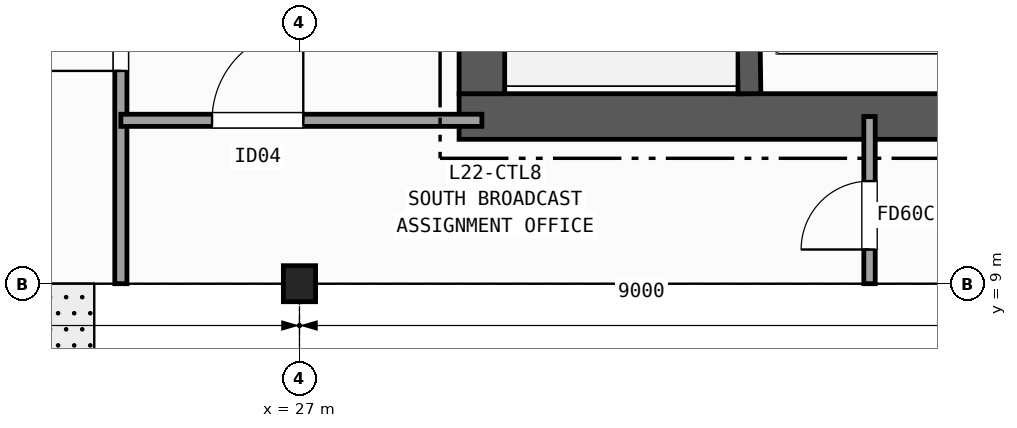
"""IFC4 building model, lengths in metres.
Left out: names, types, materials, properties, quantities, classifications, styles, units other than length and angle.
Written with IfcOpenShell. Run it as: python <this file> out.ifc"""

import sys

from ifc_helpers import new_model, si_unit, direction, frame, frame_2d, origin, origin_2d, place, context, subcontext, project, spatial, rectangle, i_section, extrude, element, fill, save


model = new_model("IFC4")
c1 = context("Model", 3, precision=1e-05, world=origin(), true_north=direction((0.0, 1.0)))
c2 = subcontext(c1, "Body", "Model", "MODEL_VIEW")
j1 = project(units=[si_unit("LENGTHUNIT", "METRE"), si_unit("PLANEANGLEUNIT", "RADIAN")], contexts=[c1])
p1 = place(None, origin())
s1 = spatial("IfcSite", under=j1, at=p1, CompositionType="ELEMENT")
p2 = place(p1, origin())
s2 = spatial("IfcBuilding", under=s1, at=p2, CompositionType="ELEMENT")
p3 = place(p2, frame((0.0, 0.0, 92.8)))
s3 = spatial("IfcBuildingStorey", under=s2, at=p3, CompositionType="ELEMENT", Elevation=92.8)
p4 = place(p3, frame((27.0, 9.0, 0.0), z_axis=(0.0, 0.0, 1.0), x_axis=(1.0, 0.0, 0.0)))
e1 = element("IfcColumn", 1, at=p4, inside=s3, PredefinedType="COLUMN", context=c2, shape_type="SweptSolid", body=[
    extrude(i_section(OverallWidth=0.424, OverallDepth=0.474, WebThickness=0.048, FlangeThickness=0.077, FilletRadius=0.015, at=origin_2d()), origin(), (0.0, 0.0, 1.0), 3.7),
])
p5 = place(p3, frame((29.1, 11.2, 0.0), z_axis=(0.0, 0.0, 1.0), x_axis=(1.0, 0.0, 0.0)))
e2 = element("IfcWall", 2, at=p5, inside=s3, PredefinedType="SHEAR", context=c2, shape_type="SweptSolid", body=[
    extrude(rectangle(XDim=14.0, YDim=0.6, at=frame_2d((7.0, 0.0))), origin(), (0.0, 0.0, 1.0), 3.42),
])
p6 = place(p3, frame((29.4, 24.3, 0.0), z_axis=(0.0, 0.0, 1.0), x_axis=(0.0, -1.0, 0.0)))
e3 = element("IfcWall", 3, at=p6, inside=s3, PredefinedType="SHEAR", context=c2, shape_type="SweptSolid", body=[
    extrude(rectangle(XDim=12.8, YDim=0.6, at=frame_2d((6.4, 0.0))), origin(), (0.0, 0.0, 1.0), 3.42),
])
p7 = place(p6, frame((1.4, 0.0, 0.0)))
e4 = element("IfcOpeningElement", 4, at=p7, cuts=e3, PredefinedType="OPENING", context=c2, shape_type="SweptSolid", body=[
    extrude(rectangle(XDim=1.35, YDim=2.15, at=frame_2d((0.675, 1.075))), frame((0.0, 0.31, 0.0), z_axis=(0.0, -1.0, 0.0), x_axis=(1.0, 0.0, 0.0)), (0.0, 0.0, 1.0), 0.62),
])
p8 = place(p3, frame((32.92, 11.5, 0.0), z_axis=(0.0, 0.0, 1.0), x_axis=(-0.013244407292, 0.999912288991, 0.0)))
e5 = element("IfcWall", 5, at=p8, inside=s3, PredefinedType="SHEAR", context=c2, shape_type="SweptSolid", body=[
    extrude(rectangle(XDim=9.051, YDim=0.3, at=frame_2d((4.525, 0.0))), origin(), (0.0, 0.0, 1.0), 3.42),
])
p9 = place(p3, frame((24.65, 9.0, 0.0), z_axis=(0.0, 0.0, 1.0), x_axis=(0.0, 1.0, 0.0)))
e6 = element("IfcWall", 6, at=p9, inside=s3, PredefinedType="PARTITIONING", context=c2, shape_type="SweptSolid", body=[
    extrude(rectangle(XDim=19.2, YDim=0.16, at=frame_2d((9.6, 0.0))), origin(), (0.0, 0.0, 1.0), 2.627),
])
p10 = place(p9, frame((2.8, 0.0, 0.0)))
e7 = element("IfcOpeningElement", 7, at=p10, cuts=e6, PredefinedType="OPENING", context=c2, shape_type="SweptSolid", body=[
    extrude(rectangle(XDim=1.05, YDim=2.15, at=frame_2d((0.525, 1.075))), frame((0.0, 0.09, 0.0), z_axis=(0.0, -1.0, 0.0), x_axis=(1.0, 0.0, 0.0)), (0.0, 0.0, 1.0), 0.18),
])
p11 = place(p9, frame((8.95, 0.0, 0.0)))
e8 = element("IfcOpeningElement", 8, at=p11, cuts=e6, PredefinedType="OPENING", context=c2, shape_type="SweptSolid", body=[
    extrude(rectangle(XDim=1.2, YDim=2.15, at=frame_2d((0.6, 1.075))), frame((0.0, 0.09, 0.0), z_axis=(0.0, -1.0, 0.0), x_axis=(1.0, 0.0, 0.0)), (0.0, 0.0, 1.0), 0.18),
])
p12 = place(p9, frame((13.44, 0.0, 0.0)))
e9 = element("IfcOpeningElement", 9, at=p12, cuts=e6, PredefinedType="OPENING", context=c2, shape_type="SweptSolid", body=[
    extrude(rectangle(XDim=0.86, YDim=2.05, at=frame_2d((0.43, 1.025))), frame((0.0, 0.09, 0.0), z_axis=(0.0, -1.0, 0.0), x_axis=(1.0, 0.0, 0.0)), (0.0, 0.0, 1.0), 0.18),
])
p13 = place(p3, frame((24.65, 11.15, 0.0), z_axis=(0.0, 0.0, 1.0), x_axis=(1.0, 0.0, 0.0)))
e10 = element("IfcWall", 10, at=p13, inside=s3, PredefinedType="PARTITIONING", context=c2, shape_type="SweptSolid", body=[
    extrude(rectangle(XDim=4.75, YDim=0.16, at=frame_2d((2.375, 0.0))), origin(), (0.0, 0.0, 1.0), 2.792),
])
p14 = place(p13, frame((1.2, 0.0, 0.0)))
e11 = element("IfcOpeningElement", 11, at=p14, cuts=e10, PredefinedType="OPENING", context=c2, shape_type="SweptSolid", body=[
    extrude(rectangle(XDim=1.2, YDim=2.15, at=frame_2d((0.6, 1.075))), frame((0.0, 0.09, 0.0), z_axis=(0.0, -1.0, 0.0), x_axis=(1.0, 0.0, 0.0)), (0.0, 0.0, 1.0), 0.18),
])
p15 = place(p3, frame((34.5, 9.0, 0.0), z_axis=(0.0, 0.0, 1.0), x_axis=(0.0, 1.0, 0.0)))
e12 = element("IfcWall", 12, at=p15, inside=s3, PredefinedType="PARTITIONING", context=c2, shape_type="SweptSolid", body=[
    extrude(rectangle(XDim=2.2, YDim=0.15, at=frame_2d((1.1, 0.0))), origin(), (0.0, 0.0, 1.0), 2.627),
])
p16 = place(p15, frame((0.45, 0.0, 0.0)))
e13 = element("IfcOpeningElement", 13, at=p16, cuts=e12, PredefinedType="OPENING", context=c2, shape_type="SweptSolid", body=[
    extrude(rectangle(XDim=0.9, YDim=2.1, at=frame_2d((0.45, 1.05))), frame((0.0, 0.085, 0.0), z_axis=(0.0, -1.0, 0.0), x_axis=(1.0, 0.0, 0.0)), (0.0, 0.0, 1.0), 0.17),
])
p17 = place(p10, origin())
e14 = element("IfcDoor", 14, at=p17, inside=s3, OperationType="SINGLE_SWING_LEFT", PredefinedType="DOOR", context=c2, shape_type="SweptSolid", body=[
    extrude(rectangle(XDim=1.05, YDim=2.15, at=frame_2d((0.525, 1.075))), frame((0.0, 0.025, 0.0), z_axis=(0.0, -1.0, 0.0), x_axis=(1.0, 0.0, 0.0)), (0.0, 0.0, 1.0), 0.05),
])
fill(e7, e14)
p18 = place(p14, origin())
e15 = element("IfcDoor", 15, at=p18, inside=s3, OperationType="SINGLE_SWING_RIGHT", PredefinedType="DOOR", context=c2, shape_type="SweptSolid", body=[
    extrude(rectangle(XDim=1.2, YDim=2.15, at=frame_2d((0.6, 1.075))), frame((0.0, 0.025, 0.0), z_axis=(0.0, -1.0, 0.0), x_axis=(1.0, 0.0, 0.0)), (0.0, 0.0, 1.0), 0.05),
])
fill(e11, e15)
p19 = place(p16, origin())
e16 = element("IfcDoor", 16, at=p19, inside=s3, OperationType="SINGLE_SWING_LEFT", PredefinedType="DOOR", context=c2, shape_type="SweptSolid", body=[
    extrude(rectangle(XDim=0.9, YDim=2.1, at=frame_2d((0.45, 1.05))), frame((0.0, 0.025, 0.0), z_axis=(0.0, -1.0, 0.0), x_axis=(1.0, 0.0, 0.0)), (0.0, 0.0, 1.0), 0.05),
])
fill(e13, e16)
save(model, sys.argv[1])
